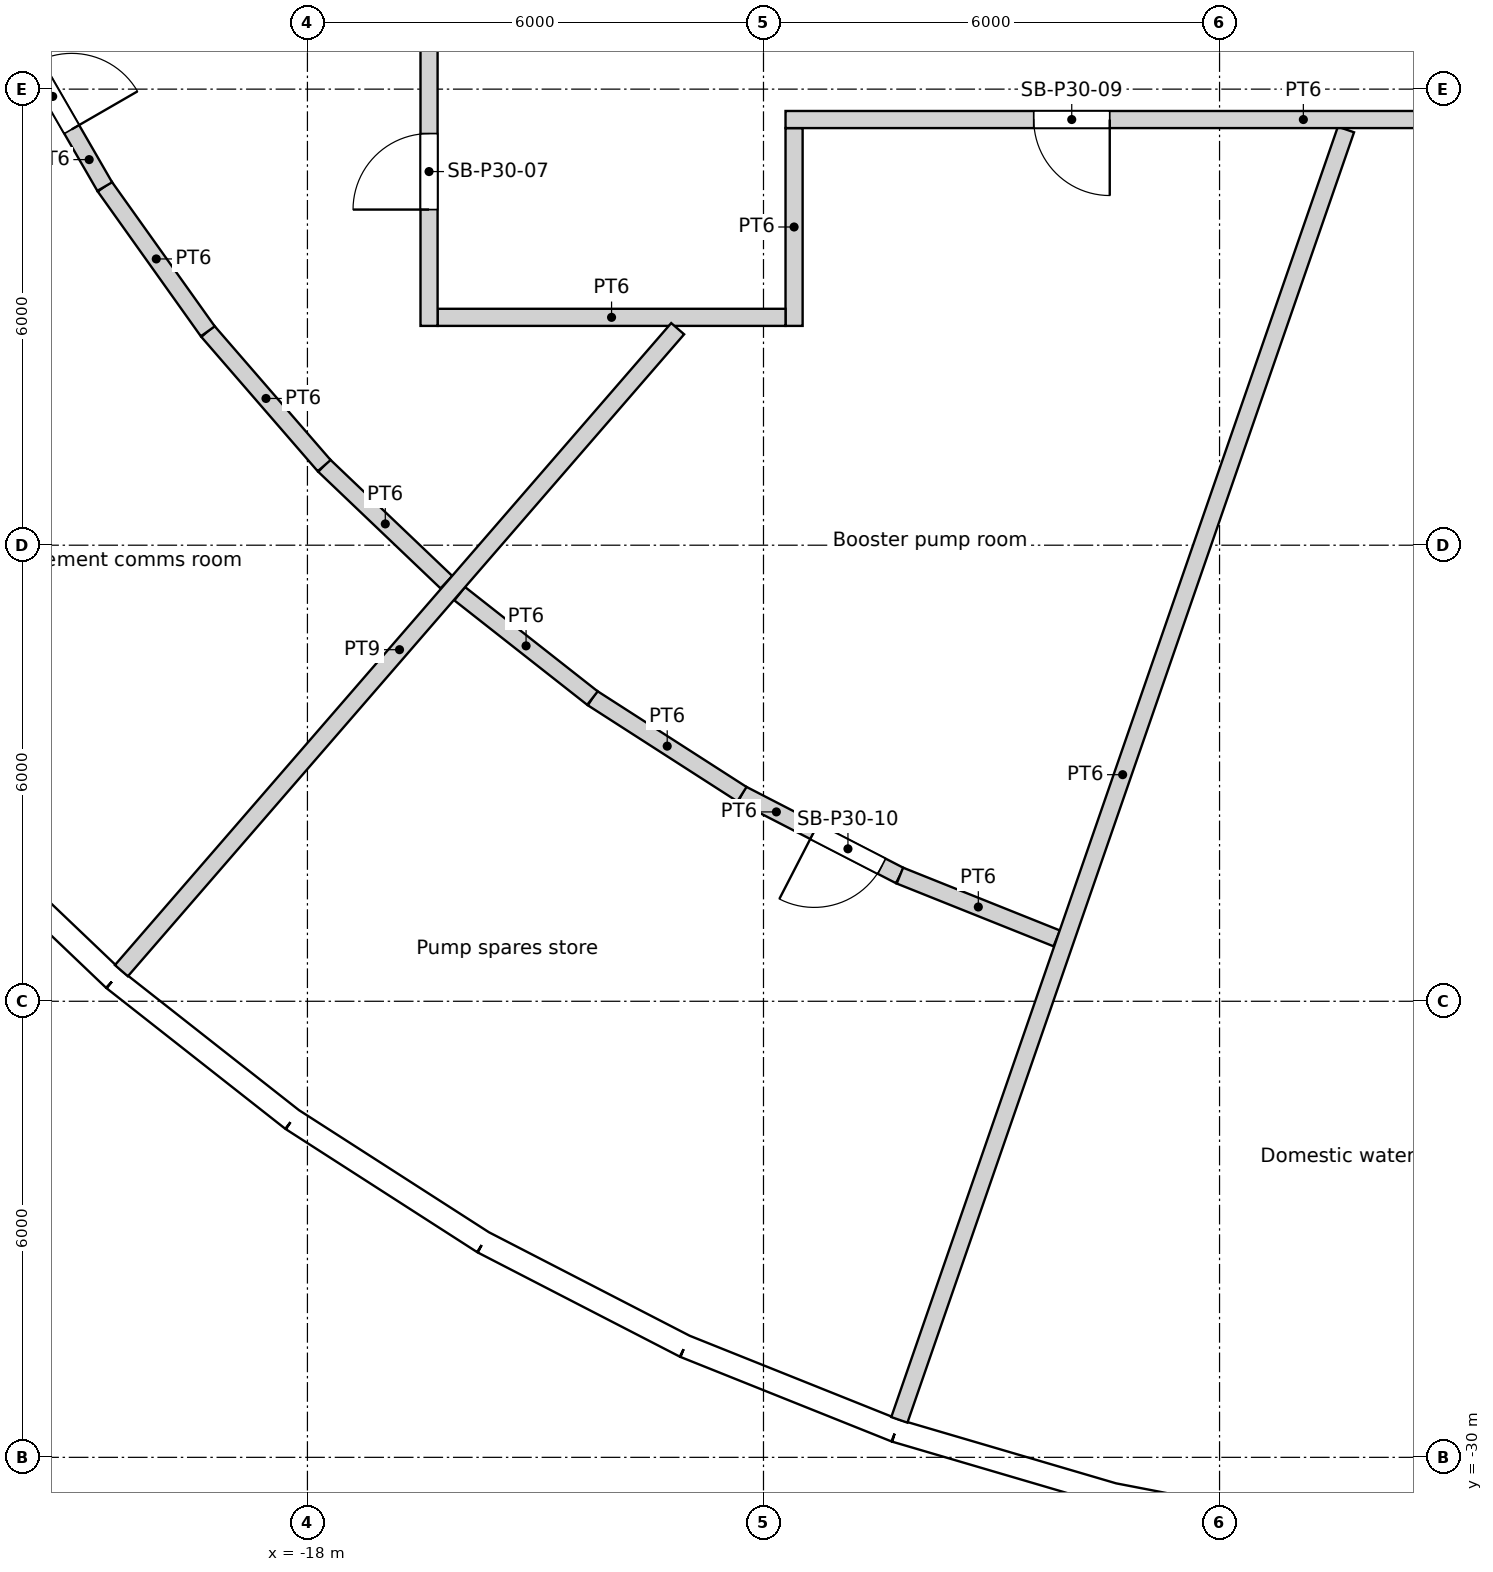
"""IFC4 building model, lengths in metres.
Left out: names, types, materials, properties, quantities, classifications, styles, units other than length and angle.
Written with IfcOpenShell. Run it as: python <this file> out.ifc"""

import sys

from ifc_helpers import new_model, si_unit, direction, frame, frame_2d, origin, origin_2d, place, context, subcontext, project, spatial, rectangle, circle, extrude, element, fill, save


model = new_model("IFC4")
c1 = context("Model", 3, precision=1e-05, world=origin(), true_north=direction((0.0, 1.0)))
c2 = subcontext(c1, "Body", "Model", "MODEL_VIEW")
j1 = project(units=[si_unit("LENGTHUNIT", "METRE"), si_unit("PLANEANGLEUNIT", "RADIAN")], contexts=[c1])
p1 = place(None, origin())
s1 = spatial("IfcSite", under=j1, at=p1, CompositionType="ELEMENT")
p2 = place(p1, origin())
s2 = spatial("IfcBuilding", under=s1, at=p2, CompositionType="ELEMENT")
p3 = place(p2, frame((0.0, 0.0, 120.0)))
s3 = spatial("IfcBuildingStorey", under=s2, at=p3, CompositionType="ELEMENT", Elevation=120.0)
for number, where, z_axis, x_axis in (
    (1, (-19.826, -22.88, 0.0), (0.0, 0.0, 1.0), (1.0, 0.0, 0.0)),
    (2, (-15.137, -26.219, 0.0), (0.0, 0.0, 1.0), (1.0, 0.0, 0.0)),
    (3, (-9.902, -28.61, 0.0), (0.0, 0.0, 1.0), (1.0, 0.0, 0.0)),
    (4, (-4.309, -29.966, 0.0), (0.0, 0.0, 1.0), (1.0, 0.0, 0.0)),
):
    element("IfcColumn", number, at=place(p3, frame(where, z_axis=z_axis, x_axis=x_axis)), inside=s3, PredefinedType="COLUMN", context=c2, shape_type="SweptSolid", body=[
        extrude(circle(Radius=0.6, at=origin_2d()), origin(), (0.0, 0.0, 1.0), 6.0),
    ])
for number, where, z_axis, x_axis in (
    (5, (-20.509, -13.489, 0.0), (0.0, 0.0, 1.0), (1.0, 0.0, 0.0)),
    (6, (-16.846, -17.855, 0.0), (0.0, 0.0, 1.0), (1.0, 0.0, 0.0)),
    (7, (-12.274, -21.259, 0.0), (0.0, 0.0, 1.0), (1.0, 0.0, 0.0)),
    (8, (-7.04, -23.516, 0.0), (0.0, 0.0, 1.0), (1.0, 0.0, 0.0)),
):
    element("IfcColumn", number, at=place(p3, frame(where, z_axis=z_axis, x_axis=x_axis)), inside=s3, PredefinedType="COLUMN", context=c2, shape_type="SweptSolid", body=[
        extrude(circle(Radius=0.65, at=origin_2d()), origin(), (0.0, 0.0, 1.0), 6.0),
    ])
for number, where, z_axis, x_axis in (
    (9, (-13.798, -12.802, 0.0), (0.0, 0.0, 1.0), (1.0, 0.0, 0.0)),
    (10, (-9.411, -16.301, 0.0), (0.0, 0.0, 1.0), (1.0, 0.0, 0.0)),
    (11, (-4.188, -18.35, 0.0), (0.0, 0.0, 1.0), (1.0, 0.0, 0.0)),
):
    element("IfcColumn", number, at=place(p3, frame(where, z_axis=z_axis, x_axis=x_axis)), inside=s3, PredefinedType="COLUMN", context=c2, shape_type="SweptSolid", body=[
        extrude(circle(Radius=0.7, at=origin_2d()), origin(), (0.0, 0.0, 1.0), 6.0),
    ])
p4 = place(p3, frame((-22.707, -21.651, 0.0), z_axis=(0.0, 0.0, 1.0), x_axis=(0.723750841228, -0.690061388444, 0.0)))
e12 = element("IfcWall", 12, at=p4, inside=s3, PredefinedType="SOLIDWALL", context=c2, shape_type="SweptSolid", body=[
    extrude(rectangle(XDim=2.986, YDim=0.3, at=frame_2d((1.493, 0.0))), origin(), (0.0, 0.0, 1.0), 5.7),
])
p5 = place(p4, frame((1.493, 0.0, 1.8)))
e13 = element("IfcOpeningElement", 13, at=p5, cuts=e12, PredefinedType="OPENING", context=c2, shape_type="SweptSolid", body=[
    extrude(circle(Radius=1.2, at=origin_2d()), frame((0.0, 0.16, 0.0), z_axis=(0.0, -1.0, 0.0), x_axis=(1.0, 0.0, 0.0)), (0.0, 0.0, 1.0), 0.32),
])
p6 = place(p3, frame((-20.546, -23.711, 0.0), z_axis=(0.0, 0.0, 1.0), x_axis=(0.786043032847, -0.618171780747, 0.0)))
e14 = element("IfcWall", 14, at=p6, inside=s3, PredefinedType="SOLIDWALL", context=c2, shape_type="SweptSolid", body=[
    extrude(rectangle(XDim=2.986, YDim=0.3, at=frame_2d((1.493, 0.0))), origin(), (0.0, 0.0, 1.0), 5.7),
])
p7 = place(p6, frame((1.493, 0.0, 1.8)))
e15 = element("IfcOpeningElement", 15, at=p7, cuts=e14, PredefinedType="OPENING", context=c2, shape_type="SweptSolid", body=[
    extrude(circle(Radius=1.2, at=origin_2d()), frame((0.0, 0.16, 0.0), z_axis=(0.0, -1.0, 0.0), x_axis=(1.0, 0.0, 0.0)), (0.0, 0.0, 1.0), 0.32),
])
p8 = place(p3, frame((-18.199, -25.557, 0.0), z_axis=(0.0, 0.0, 1.0), x_axis=(0.841242231846, -0.540658401727, 0.0)))
e16 = element("IfcWall", 16, at=p8, inside=s3, PredefinedType="SOLIDWALL", context=c2, shape_type="SweptSolid", body=[
    extrude(rectangle(XDim=2.986, YDim=0.3, at=frame_2d((1.493, 0.0))), origin(), (0.0, 0.0, 1.0), 5.7),
])
p9 = place(p8, frame((1.493, 0.0, 1.8)))
e17 = element("IfcOpeningElement", 17, at=p9, cuts=e16, PredefinedType="OPENING", context=c2, shape_type="SweptSolid", body=[
    extrude(circle(Radius=1.2, at=origin_2d()), frame((0.0, 0.16, 0.0), z_axis=(0.0, -1.0, 0.0), x_axis=(1.0, 0.0, 0.0)), (0.0, 0.0, 1.0), 0.32),
])
p10 = place(p3, frame((-15.687, -27.171, 0.0), z_axis=(0.0, 0.0, 1.0), x_axis=(0.888831268481, -0.458234630043, 0.0)))
e18 = element("IfcWall", 18, at=p10, inside=s3, PredefinedType="SOLIDWALL", context=c2, shape_type="SweptSolid", body=[
    extrude(rectangle(XDim=2.986, YDim=0.3, at=frame_2d((1.493, 0.0))), origin(), (0.0, 0.0, 1.0), 5.7),
])
p11 = place(p10, frame((1.493, 0.0, 1.8)))
e19 = element("IfcOpeningElement", 19, at=p11, cuts=e18, PredefinedType="OPENING", context=c2, shape_type="SweptSolid", body=[
    extrude(circle(Radius=1.2, at=origin_2d()), frame((0.0, 0.16, 0.0), z_axis=(0.0, -1.0, 0.0), x_axis=(1.0, 0.0, 0.0)), (0.0, 0.0, 1.0), 0.32),
])
p12 = place(p3, frame((-13.033, -28.539, 0.0), z_axis=(0.0, 0.0, 1.0), x_axis=(0.928380795373, -0.371630325434, 0.0)))
e20 = element("IfcWall", 20, at=p12, inside=s3, PredefinedType="SOLIDWALL", context=c2, shape_type="SweptSolid", body=[
    extrude(rectangle(XDim=2.986, YDim=0.3, at=frame_2d((1.493, 0.0))), origin(), (0.0, 0.0, 1.0), 5.7),
])
p13 = place(p12, frame((1.493, 0.0, 1.8)))
e21 = element("IfcOpeningElement", 21, at=p13, cuts=e20, PredefinedType="OPENING", context=c2, shape_type="SweptSolid", body=[
    extrude(circle(Radius=1.2, at=origin_2d()), frame((0.0, 0.16, 0.0), z_axis=(0.0, -1.0, 0.0), x_axis=(1.0, 0.0, 0.0)), (0.0, 0.0, 1.0), 0.32),
])
p14 = place(p3, frame((-10.261, -29.649, 0.0), z_axis=(0.0, 0.0, 1.0), x_axis=(0.959502108153, -0.281701445593, 0.0)))
e22 = element("IfcWall", 22, at=p14, inside=s3, PredefinedType="SOLIDWALL", context=c2, shape_type="SweptSolid", body=[
    extrude(rectangle(XDim=2.986, YDim=0.3, at=frame_2d((1.493, 0.0))), origin(), (0.0, 0.0, 1.0), 5.7),
])
p15 = place(p14, frame((1.493, 0.0, 1.8)))
e23 = element("IfcOpeningElement", 23, at=p15, cuts=e22, PredefinedType="OPENING", context=c2, shape_type="SweptSolid", body=[
    extrude(circle(Radius=1.2, at=origin_2d()), frame((0.0, 0.16, 0.0), z_axis=(0.0, -1.0, 0.0), x_axis=(1.0, 0.0, 0.0)), (0.0, 0.0, 1.0), 0.32),
])
p16 = place(p3, frame((-7.397, -30.49, 0.0), z_axis=(0.0, 0.0, 1.0), x_axis=(0.981918853666, -0.189302310646, 0.0)))
e24 = element("IfcWall", 24, at=p16, inside=s3, PredefinedType="SOLIDWALL", context=c2, shape_type="SweptSolid", body=[
    extrude(rectangle(XDim=2.986, YDim=0.3, at=frame_2d((1.493, 0.0))), origin(), (0.0, 0.0, 1.0), 5.7),
])
p17 = place(p16, frame((1.493, 0.0, 1.8)))
e25 = element("IfcOpeningElement", 25, at=p17, cuts=e24, PredefinedType="OPENING", context=c2, shape_type="SweptSolid", body=[
    extrude(circle(Radius=1.2, at=origin_2d()), frame((0.0, 0.16, 0.0), z_axis=(0.0, -1.0, 0.0), x_axis=(1.0, 0.0, 0.0)), (0.0, 0.0, 1.0), 0.32),
])
p18 = place(p3, frame((-20.667, -13.282, 0.0), z_axis=(0.0, 0.0, 1.0), x_axis=(-0.500002679963, 0.866023856502, 0.0)))
e26 = element("IfcWall", 26, at=p18, inside=s3, PredefinedType="PARTITIONING", context=c2, shape_type="SweptSolid", body=[
    extrude(rectangle(XDim=2.338, YDim=0.225, at=frame_2d((1.169, 0.0))), origin(), (0.0, 0.0, 1.0), 5.2),
])
p19 = place(p18, frame((0.869, 0.0, 0.0)))
e27 = element("IfcOpeningElement", 27, at=p19, cuts=e26, PredefinedType="OPENING", context=c2, shape_type="SweptSolid", body=[
    extrude(rectangle(XDim=1.0, YDim=2.1, at=frame_2d((0.5, 1.05))), frame((0.0, 0.113, 0.0), z_axis=(0.0, -1.0, 0.0), x_axis=(1.0, 0.0, 0.0)), (0.0, 0.0, 1.0), 0.225),
])
p20 = place(p3, frame((-20.667, -13.282, 0.0), z_axis=(0.0, 0.0, 1.0), x_axis=(0.580032319147, -0.814593462252, 0.0)))
e28 = element("IfcWall", 28, at=p20, inside=s3, PredefinedType="PARTITIONING", context=c2, shape_type="SweptSolid", body=[
    extrude(rectangle(XDim=2.338, YDim=0.225, at=frame_2d((1.169, 0.0))), origin(), (0.0, 0.0, 1.0), 5.2),
])
p21 = place(p3, frame((-20.448, -23.598, 0.0), z_axis=(0.0, 0.0, 1.0), x_axis=(0.654864001214, 0.755746743237, 0.0)))
e29 = element("IfcWall", 29, at=p21, inside=s3, PredefinedType="PARTITIONING", context=c2, shape_type="SweptSolid", body=[
    extrude(rectangle(XDim=11.176, YDim=0.225, at=frame_2d((5.588, 0.0))), origin(), (0.0, 0.0, 1.0), 2.7),
])
p22 = place(p3, frame((-19.311, -15.186, 0.0), z_axis=(0.0, 0.0, 1.0), x_axis=(0.654866925236, -0.755744209526, 0.0)))
e30 = element("IfcWall", 30, at=p22, inside=s3, PredefinedType="PARTITIONING", context=c2, shape_type="SweptSolid", body=[
    extrude(rectangle(XDim=2.338, YDim=0.225, at=frame_2d((1.169, 0.0))), origin(), (0.0, 0.0, 1.0), 5.2),
])
p23 = place(p3, frame((-17.78, -16.953, 0.0), z_axis=(0.0, 0.0, 1.0), x_axis=(0.723659715245, -0.690156950651, 0.0)))
e31 = element("IfcWall", 31, at=p23, inside=s3, PredefinedType="PARTITIONING", context=c2, shape_type="SweptSolid", body=[
    extrude(rectangle(XDim=2.223, YDim=0.225, at=frame_2d((1.111, 0.0))), origin(), (0.0, 0.0, 1.0), 5.2),
])
p24 = place(p3, frame((-16.288, -15.002, 0.0), z_axis=(0.0, 0.0, 1.0), x_axis=(1.0, 0.0, 0.0)))
e32 = element("IfcWall", 32, at=p24, inside=s3, PredefinedType="PARTITIONING", context=c2, shape_type="SweptSolid", body=[
    extrude(rectangle(XDim=4.577, YDim=0.225, at=frame_2d((2.289, 0.0))), origin(), (0.0, 0.0, 1.0), 5.2),
])
p25 = place(p3, frame((-16.4, -10.254, 0.0), z_axis=(0.0, 0.0, 1.0), x_axis=(0.0, -1.0, 0.0)))
e33 = element("IfcWall", 33, at=p25, inside=s3, PredefinedType="PARTITIONING", context=c2, shape_type="SweptSolid", body=[
    extrude(rectangle(XDim=4.861, YDim=0.225, at=frame_2d((2.43, 0.0))), origin(), (0.0, 0.0, 1.0), 5.2),
])
p26 = place(p25, frame((2.33, 0.0, 0.0)))
e34 = element("IfcOpeningElement", 34, at=p26, cuts=e33, PredefinedType="OPENING", context=c2, shape_type="SweptSolid", body=[
    extrude(rectangle(XDim=1.0, YDim=2.1, at=frame_2d((0.5, 1.05))), frame((0.0, 0.113, 0.0), z_axis=(0.0, -1.0, 0.0), x_axis=(1.0, 0.0, 0.0)), (0.0, 0.0, 1.0), 0.225),
])
p27 = place(p3, frame((-15.997, -18.638, 0.0), z_axis=(0.0, 0.0, 1.0), x_axis=(0.786123914526, -0.618068920922, 0.0)))
e35 = element("IfcWall", 35, at=p27, inside=s3, PredefinedType="PARTITIONING", context=c2, shape_type="SweptSolid", body=[
    extrude(rectangle(XDim=2.223, YDim=0.225, at=frame_2d((1.111, 0.0))), origin(), (0.0, 0.0, 1.0), 5.2),
])
p28 = place(p3, frame((-14.25, -20.011, 0.0), z_axis=(0.0, 0.0, 1.0), x_axis=(0.841236155743, -0.540667855777, 0.0)))
e36 = element("IfcWall", 36, at=p28, inside=s3, PredefinedType="PARTITIONING", context=c2, shape_type="SweptSolid", body=[
    extrude(rectangle(XDim=2.338, YDim=0.225, at=frame_2d((1.169, 0.0))), origin(), (0.0, 0.0, 1.0), 5.2),
])
p29 = place(p3, frame((-10.205, -22.347, 0.0), z_axis=(0.0, 0.0, 1.0), x_axis=(-0.888845697941, 0.458206640339, 0.0)))
e37 = element("IfcWall", 37, at=p29, inside=s3, PredefinedType="PARTITIONING", context=c2, shape_type="SweptSolid", body=[
    extrude(rectangle(XDim=2.338, YDim=0.225, at=frame_2d((1.169, 0.0))), origin(), (0.0, 0.0, 1.0), 5.2),
])
p30 = place(p29, frame((0.269, 0.0, 0.0)))
e38 = element("IfcOpeningElement", 38, at=p30, cuts=e37, PredefinedType="OPENING", context=c2, shape_type="SweptSolid", body=[
    extrude(rectangle(XDim=1.0, YDim=2.1, at=frame_2d((0.5, 1.05))), frame((0.0, 0.113, 0.0), z_axis=(0.0, -1.0, 0.0), x_axis=(1.0, 0.0, 0.0)), (0.0, 0.0, 1.0), 0.225),
])
p31 = place(p3, frame((-11.598, -15.115, 0.0), z_axis=(0.0, 0.0, 1.0), x_axis=(0.0, 1.0, 0.0)))
e39 = element("IfcWall", 39, at=p31, inside=s3, PredefinedType="PARTITIONING", context=c2, shape_type="SweptSolid", body=[
    extrude(rectangle(XDim=2.602, YDim=0.225, at=frame_2d((1.301, 0.0))), origin(), (0.0, 0.0, 1.0), 5.2),
])
p32 = place(p3, frame((-11.71, -12.4, 0.0), z_axis=(0.0, 0.0, 1.0), x_axis=(1.0, 0.0, 0.0)))
e40 = element("IfcWall", 40, at=p32, inside=s3, PredefinedType="PARTITIONING", context=c2, shape_type="SweptSolid", body=[
    extrude(rectangle(XDim=14.12, YDim=0.225, at=frame_2d((7.06, 0.0))), origin(), (0.0, 0.0, 1.0), 5.2),
])
p33 = place(p32, frame((3.265, 0.0, 0.0)))
e41 = element("IfcOpeningElement", 41, at=p33, cuts=e40, PredefinedType="OPENING", context=c2, shape_type="SweptSolid", body=[
    extrude(rectangle(XDim=1.0, YDim=2.1, at=frame_2d((0.5, 1.05))), frame((0.0, 0.113, 0.0), z_axis=(0.0, -1.0, 0.0), x_axis=(1.0, 0.0, 0.0)), (0.0, 0.0, 1.0), 0.225),
])
p34 = place(p32, frame((9.36, 0.0, 0.0)))
e42 = element("IfcOpeningElement", 42, at=p34, cuts=e40, PredefinedType="OPENING", context=c2, shape_type="SweptSolid", body=[
    extrude(rectangle(XDim=1.0, YDim=2.1, at=frame_2d((0.5, 1.05))), frame((0.0, 0.113, 0.0), z_axis=(0.0, -1.0, 0.0), x_axis=(1.0, 0.0, 0.0)), (0.0, 0.0, 1.0), 0.225),
])
p35 = place(p32, frame((12.768, 0.0, 0.0)))
e43 = element("IfcOpeningElement", 43, at=p35, cuts=e40, PredefinedType="OPENING", context=c2, shape_type="SweptSolid", body=[
    extrude(rectangle(XDim=1.0, YDim=2.1, at=frame_2d((0.5, 1.05))), frame((0.0, 0.113, 0.0), z_axis=(0.0, -1.0, 0.0), x_axis=(1.0, 0.0, 0.0)), (0.0, 0.0, 1.0), 0.225),
])
p36 = place(p3, frame((-10.212, -29.507, 0.0), z_axis=(0.0, 0.0, 1.0), x_axis=(0.32706855335, 0.945000614502, 0.0)))
e44 = element("IfcWall", 44, at=p36, inside=s3, PredefinedType="PARTITIONING", context=c2, shape_type="SweptSolid", body=[
    extrude(rectangle(XDim=17.964, YDim=0.225, at=frame_2d((8.982, 0.0))), origin(), (0.0, 0.0, 1.0), 5.2),
])
p37 = place(p3, frame((-10.205, -22.347, 0.0), z_axis=(0.0, 0.0, 1.0), x_axis=(0.92837816823, -0.371636888312, 0.0)))
e45 = element("IfcWall", 45, at=p37, inside=s3, PredefinedType="PARTITIONING", context=c2, shape_type="SweptSolid", body=[
    extrude(rectangle(XDim=2.222, YDim=0.225, at=frame_2d((1.111, 0.0))), origin(), (0.0, 0.0, 1.0), 5.2),
])
p38 = place(p5, origin())
e46 = element("IfcWindow", 46, at=p38, inside=s3, PartitioningType="SINGLE_PANEL", PredefinedType="WINDOW", context=c2, shape_type="SweptSolid", body=[
    extrude(circle(Radius=1.2, at=origin_2d()), frame((0.0, 0.12, 0.0), z_axis=(0.0, -1.0, 0.0), x_axis=(1.0, 0.0, 0.0)), (0.0, 0.0, 1.0), 0.1),
])
fill(e13, e46)
p39 = place(p7, origin())
e47 = element("IfcWindow", 47, at=p39, inside=s3, PartitioningType="SINGLE_PANEL", PredefinedType="WINDOW", context=c2, shape_type="SweptSolid", body=[
    extrude(circle(Radius=1.2, at=origin_2d()), frame((0.0, 0.12, 0.0), z_axis=(0.0, -1.0, 0.0), x_axis=(1.0, 0.0, 0.0)), (0.0, 0.0, 1.0), 0.1),
])
fill(e15, e47)
p40 = place(p9, origin())
e48 = element("IfcWindow", 48, at=p40, inside=s3, PartitioningType="SINGLE_PANEL", PredefinedType="WINDOW", context=c2, shape_type="SweptSolid", body=[
    extrude(circle(Radius=1.2, at=origin_2d()), frame((0.0, 0.12, 0.0), z_axis=(0.0, -1.0, 0.0), x_axis=(1.0, 0.0, 0.0)), (0.0, 0.0, 1.0), 0.1),
])
fill(e17, e48)
p41 = place(p11, origin())
e49 = element("IfcWindow", 49, at=p41, inside=s3, PartitioningType="SINGLE_PANEL", PredefinedType="WINDOW", context=c2, shape_type="SweptSolid", body=[
    extrude(circle(Radius=1.2, at=origin_2d()), frame((0.0, 0.12, 0.0), z_axis=(0.0, -1.0, 0.0), x_axis=(1.0, 0.0, 0.0)), (0.0, 0.0, 1.0), 0.1),
])
fill(e19, e49)
p42 = place(p13, origin())
e50 = element("IfcWindow", 50, at=p42, inside=s3, PartitioningType="SINGLE_PANEL", PredefinedType="WINDOW", context=c2, shape_type="SweptSolid", body=[
    extrude(circle(Radius=1.2, at=origin_2d()), frame((0.0, 0.12, 0.0), z_axis=(0.0, -1.0, 0.0), x_axis=(1.0, 0.0, 0.0)), (0.0, 0.0, 1.0), 0.1),
])
fill(e21, e50)
p43 = place(p15, origin())
e51 = element("IfcWindow", 51, at=p43, inside=s3, PartitioningType="SINGLE_PANEL", PredefinedType="WINDOW", context=c2, shape_type="SweptSolid", body=[
    extrude(circle(Radius=1.2, at=origin_2d()), frame((0.0, 0.12, 0.0), z_axis=(0.0, -1.0, 0.0), x_axis=(1.0, 0.0, 0.0)), (0.0, 0.0, 1.0), 0.1),
])
fill(e23, e51)
p44 = place(p17, origin())
e52 = element("IfcWindow", 52, at=p44, inside=s3, PartitioningType="SINGLE_PANEL", PredefinedType="WINDOW", context=c2, shape_type="SweptSolid", body=[
    extrude(circle(Radius=1.2, at=origin_2d()), frame((0.0, 0.12, 0.0), z_axis=(0.0, -1.0, 0.0), x_axis=(1.0, 0.0, 0.0)), (0.0, 0.0, 1.0), 0.1),
])
fill(e25, e52)
p45 = place(p26, origin())
e53 = element("IfcDoor", 53, at=p45, inside=s3, OperationType="SINGLE_SWING_LEFT", PredefinedType="DOOR", context=c2, shape_type="SweptSolid", body=[
    extrude(rectangle(XDim=1.0, YDim=2.1, at=frame_2d((0.5, 1.05))), frame((0.0, 0.025, 0.0), z_axis=(0.0, -1.0, 0.0), x_axis=(1.0, 0.0, 0.0)), (0.0, 0.0, 1.0), 0.05),
])
fill(e34, e53)
p46 = place(p19, origin())
e54 = element("IfcDoor", 54, at=p46, inside=s3, OperationType="SINGLE_SWING_RIGHT", PredefinedType="DOOR", context=c2, shape_type="SweptSolid", body=[
    extrude(rectangle(XDim=1.0, YDim=2.1, at=frame_2d((0.5, 1.05))), frame((0.0, 0.025, 0.0), z_axis=(0.0, -1.0, 0.0), x_axis=(1.0, 0.0, 0.0)), (0.0, 0.0, 1.0), 0.05),
])
fill(e27, e54)
p47 = place(p33, origin())
e55 = element("IfcDoor", 55, at=p47, inside=s3, OperationType="SINGLE_SWING_LEFT", PredefinedType="DOOR", context=c2, shape_type="SweptSolid", body=[
    extrude(rectangle(XDim=1.0, YDim=2.1, at=frame_2d((0.5, 1.05))), frame((0.0, 0.025, 0.0), z_axis=(0.0, -1.0, 0.0), x_axis=(1.0, 0.0, 0.0)), (0.0, 0.0, 1.0), 0.05),
])
fill(e41, e55)
p48 = place(p30, origin())
e56 = element("IfcDoor", 56, at=p48, inside=s3, OperationType="SINGLE_SWING_RIGHT", PredefinedType="DOOR", context=c2, shape_type="SweptSolid", body=[
    extrude(rectangle(XDim=1.0, YDim=2.1, at=frame_2d((0.5, 1.05))), frame((0.0, 0.025, 0.0), z_axis=(0.0, -1.0, 0.0), x_axis=(1.0, 0.0, 0.0)), (0.0, 0.0, 1.0), 0.05),
])
fill(e38, e56)
save(model, sys.argv[1])
